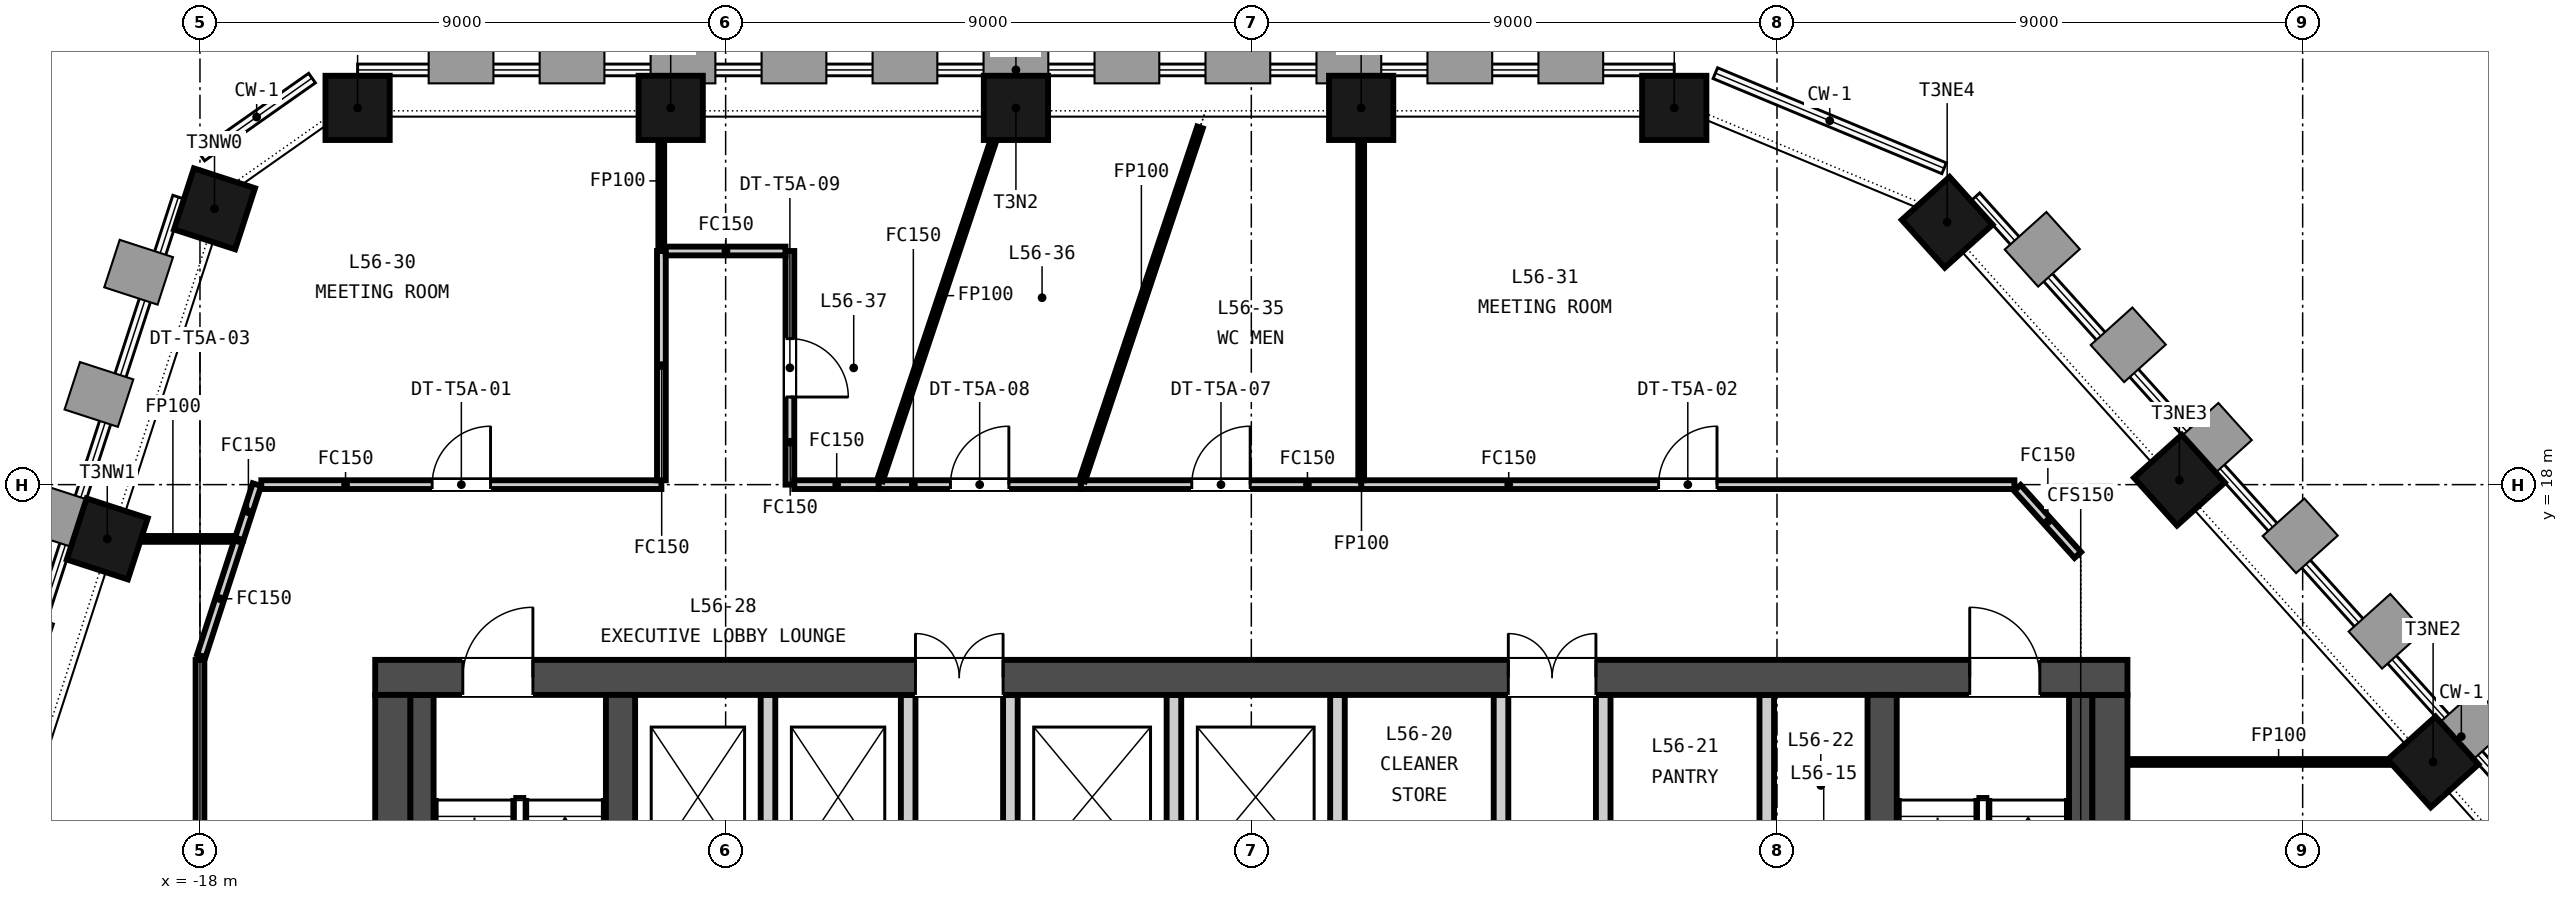
"""IFC4 building model, lengths in metres.
Left out: names, types, materials, properties, quantities, classifications, styles, units other than length and angle.
Written with IfcOpenShell. Run it as: python <this file> out.ifc"""

import sys

from ifc_helpers import new_model, si_unit, direction, frame, frame_2d, origin, origin_2d, place, context, subcontext, project, spatial, rectangle, extrude, element, fill, save


model = new_model("IFC4")
c1 = context("Model", 3, precision=1e-05, world=origin(), true_north=direction((0.0, 1.0)))
c2 = subcontext(c1, "Body", "Model", "MODEL_VIEW")
j1 = project(units=[si_unit("LENGTHUNIT", "METRE"), si_unit("PLANEANGLEUNIT", "RADIAN")], contexts=[c1])
p1 = place(None, origin())
s1 = spatial("IfcSite", under=j1, at=p1, CompositionType="ELEMENT")
p2 = place(p1, origin())
s2 = spatial("IfcBuilding", under=s1, at=p2, CompositionType="ELEMENT")
p3 = place(p2, frame((0.0, 0.0, 223.6)))
s3 = spatial("IfcBuildingStorey", under=s2, at=p3, CompositionType="ELEMENT", Elevation=223.6)
p4 = place(p3, frame((-15.0, 14.7, -0.15), z_axis=(0.0, 0.0, 1.0), x_axis=(1.0, 0.0, 0.0)))
e1 = element("IfcWall", 1, at=p4, inside=s3, PredefinedType="SOLIDWALL", context=c2, shape_type="SweptSolid", body=[
    extrude(rectangle(XDim=30.0, YDim=0.6, at=frame_2d((15.0, 0.0))), origin(), (0.0, 0.0, 1.0), 3.65),
])
p5 = place(p4, frame((9.25, 0.0, 0.15)))
e2 = element("IfcOpeningElement", 2, at=p5, cuts=e1, PredefinedType="OPENING", context=c2, shape_type="SweptSolid", body=[
    extrude(rectangle(XDim=1.5, YDim=2.1, at=frame_2d((0.75, 1.05))), frame((0.0, 0.31, 0.0), z_axis=(0.0, -1.0, 0.0), x_axis=(1.0, 0.0, 0.0)), (0.0, 0.0, 1.0), 0.62),
])
p6 = place(p4, frame((19.4, 0.0, 0.15)))
e3 = element("IfcOpeningElement", 3, at=p6, cuts=e1, PredefinedType="OPENING", context=c2, shape_type="SweptSolid", body=[
    extrude(rectangle(XDim=1.5, YDim=2.1, at=frame_2d((0.75, 1.05))), frame((0.0, 0.31, 0.0), z_axis=(0.0, -1.0, 0.0), x_axis=(1.0, 0.0, 0.0)), (0.0, 0.0, 1.0), 0.62),
])
p7 = place(p4, frame((1.5, 0.0, 0.15)))
e4 = element("IfcOpeningElement", 4, at=p7, cuts=e1, PredefinedType="OPENING", context=c2, shape_type="SweptSolid", body=[
    extrude(rectangle(XDim=1.2, YDim=2.1, at=frame_2d((0.6, 1.05))), frame((0.0, 0.31, 0.0), z_axis=(0.0, -1.0, 0.0), x_axis=(1.0, 0.0, 0.0)), (0.0, 0.0, 1.0), 0.62),
])
p8 = place(p4, frame((27.3, 0.0, 0.15)))
e5 = element("IfcOpeningElement", 5, at=p8, cuts=e1, PredefinedType="OPENING", context=c2, shape_type="SweptSolid", body=[
    extrude(rectangle(XDim=1.2, YDim=2.1, at=frame_2d((0.6, 1.05))), frame((0.0, 0.31, 0.0), z_axis=(0.0, -1.0, 0.0), x_axis=(1.0, 0.0, 0.0)), (0.0, 0.0, 1.0), 0.62),
])
for number, where, z_axis, x_axis in (
    (6, (-14.7, 0.6, -0.15), (0.0, 0.0, 1.0), (0.0, 1.0, 0.0)),
    (7, (14.7, 0.6, -0.15), (0.0, 0.0, 1.0), (0.0, 1.0, 0.0)),
):
    element("IfcWall", number, at=place(p3, frame(where, z_axis=z_axis, x_axis=x_axis)), inside=s3, PredefinedType="SOLIDWALL", context=c2, shape_type="SweptSolid", body=[
        extrude(rectangle(XDim=13.8, YDim=0.6, at=frame_2d((6.9, 0.0))), origin(), (0.0, 0.0, 1.0), 3.65),
    ])
for number, where, z_axis, x_axis in (
    (8, (-10.8, 0.6, -0.15), (0.0, 0.0, 1.0), (0.0, 1.0, 0.0)),
    (9, (10.8, 0.6, -0.15), (0.0, 0.0, 1.0), (0.0, 1.0, 0.0)),
):
    element("IfcWall", number, at=place(p3, frame(where, z_axis=z_axis, x_axis=x_axis)), inside=s3, PredefinedType="SOLIDWALL", context=c2, shape_type="SweptSolid", body=[
        extrude(rectangle(XDim=13.8, YDim=0.5, at=frame_2d((6.9, 0.0))), origin(), (0.0, 0.0, 1.0), 3.65),
    ])
for number, where, z_axis, x_axis in (
    (10, (7.241, 24.45, -0.15), (0.0, 0.0, 1.0), (-1.0, 0.0, 0.0)),
    (11, (1.881, 24.45, -0.15), (0.0, 0.0, 1.0), (-1.0, 0.0, 0.0)),
    (12, (-4.03, 24.45, -0.15), (0.0, 0.0, 1.0), (-1.0, 0.0, 0.0)),
    (13, (-9.941, 24.45, -0.15), (0.0, 0.0, 1.0), (-1.0, 0.0, 0.0)),
    (14, (-15.301, 24.45, -0.15), (0.0, 0.0, 1.0), (-1.0, 0.0, 0.0)),
    (15, (-17.751, 22.722, -0.15), (0.0, 0.0, 1.0), (-0.309, -0.951, 0.0)),
    (16, (-19.587, 17.071, -0.15), (0.0, 0.0, 1.0), (-0.309, -0.951, 0.0)),
    (17, (20.233, 13.252, -0.15), (0.0, 0.0, 1.0), (-0.669, 0.743, 0.0)),
    (18, (15.89, 18.076, -0.15), (0.0, 0.0, 1.0), (-0.669, 0.743, 0.0)),
    (19, (11.914, 22.492, -0.15), (0.0, 0.0, 1.0), (-0.669, 0.743, 0.0)),
):
    element("IfcColumn", number, at=place(p3, frame(where, z_axis=z_axis, x_axis=x_axis)), inside=s3, PredefinedType="COLUMN", context=c2, shape_type="SweptSolid", body=[
        extrude(rectangle(XDim=1.1, YDim=1.1, at=origin_2d()), origin(), (0.0, 0.0, 1.0), 3.65),
    ])
for number, where, z_axis, x_axis in (
    (20, (-8.275, 11.3, 0.0), (0.0, 0.0, 1.0), (0.0, 1.0, 0.0)),
    (21, (-5.875, 11.3, 0.0), (0.0, 0.0, 1.0), (0.0, 1.0, 0.0)),
    (22, (-4.125, 11.3, 0.0), (0.0, 0.0, 1.0), (0.0, 1.0, 0.0)),
    (23, (-1.325, 11.3, 0.0), (0.0, 0.0, 1.0), (0.0, 1.0, 0.0)),
    (24, (1.475, 11.3, 0.0), (0.0, 0.0, 1.0), (0.0, 1.0, 0.0)),
    (25, (4.275, 11.3, 0.0), (0.0, 0.0, 1.0), (0.0, 1.0, 0.0)),
    (26, (6.025, 11.3, 0.0), (0.0, 0.0, 1.0), (0.0, 1.0, 0.0)),
    (27, (8.825, 11.3, 0.0), (0.0, 0.0, 1.0), (0.0, 1.0, 0.0)),
):
    element("IfcWall", number, at=place(p3, frame(where, z_axis=z_axis, x_axis=x_axis)), inside=s3, PredefinedType="PARTITIONING", context=c2, shape_type="SweptSolid", body=[
        extrude(rectangle(XDim=3.1, YDim=0.25, at=frame_2d((1.55, 0.0))), origin(), (0.0, 0.0, 1.0), 3.5),
    ])
for number, where, z_axis, x_axis in (
    (28, (-14.2, 0.6, 0.0), (0.0, 0.0, 1.0), (0.0, 1.0, 0.0)),
    (29, (14.2, 0.6, 0.0), (0.0, 0.0, 1.0), (0.0, 1.0, 0.0)),
):
    element("IfcWall", number, at=place(p3, frame(where, z_axis=z_axis, x_axis=x_axis)), inside=s3, PredefinedType="SOLIDWALL", context=c2, shape_type="SweptSolid", body=[
        extrude(rectangle(XDim=13.8, YDim=0.4, at=frame_2d((6.9, 0.0))), origin(), (0.0, 0.0, 1.0), 3.5),
    ])
p9 = place(p3, frame((-7.9, 22.0, 0.0), z_axis=(0.0, 0.0, 1.0), x_axis=(0.0, -1.0, 0.0)))
e30 = element("IfcWall", 30, at=p9, inside=s3, PredefinedType="PARTITIONING", context=c2, shape_type="SweptSolid", body=[
    extrude(rectangle(XDim=4.0, YDim=0.15, at=frame_2d((2.0, 0.0))), origin(), (0.0, 0.0, 1.0), 2.75),
])
p10 = place(p9, frame((1.5, 0.0, 0.0)))
e31 = element("IfcOpeningElement", 31, at=p10, cuts=e30, PredefinedType="OPENING", context=c2, shape_type="SweptSolid", body=[
    extrude(rectangle(XDim=1.0, YDim=2.1, at=frame_2d((0.5, 1.05))), frame((0.0, 0.085, 0.0), z_axis=(0.0, -1.0, 0.0), x_axis=(1.0, 0.0, 0.0)), (0.0, 0.0, 1.0), 0.17),
])
p11 = place(p3, frame((-17.327, 17.071, 0.0), z_axis=(0.0, 0.0, 1.0), x_axis=(0.309170843074, 0.951006514064, 0.0)))
e32 = element("IfcWall", 32, at=p11, inside=s3, PredefinedType="PARTITIONING", context=c2, shape_type="SweptSolid", body=[
    extrude(rectangle(XDim=0.977, YDim=0.15, at=frame_2d((0.488, 0.0))), origin(), (0.0, 0.0, 1.0), 2.75),
])
p12 = place(p3, frame((-16.95, 18.0, 0.0), z_axis=(0.0, 0.0, 1.0), x_axis=(1.0, 0.0, 0.0)))
e33 = element("IfcWall", 33, at=p12, inside=s3, PredefinedType="PARTITIONING", context=c2, shape_type="SweptSolid", body=[
    extrude(rectangle(XDim=6.85, YDim=0.15, at=frame_2d((3.425, 0.0))), origin(), (0.0, 0.0, 1.0), 2.75),
])
p13 = place(p12, frame((2.925, 0.0, 0.0)))
e34 = element("IfcOpeningElement", 34, at=p13, cuts=e33, PredefinedType="OPENING", context=c2, shape_type="SweptSolid", body=[
    extrude(rectangle(XDim=1.0, YDim=2.1, at=frame_2d((0.5, 1.05))), frame((0.0, 0.085, 0.0), z_axis=(0.0, -1.0, 0.0), x_axis=(1.0, 0.0, 0.0)), (0.0, 0.0, 1.0), 0.17),
])
p14 = place(p3, frame((-10.1, 18.075, 0.0), z_axis=(0.0, 0.0, 1.0), x_axis=(0.0, 1.0, 0.0)))
e35 = element("IfcWall", 35, at=p14, inside=s3, PredefinedType="PARTITIONING", context=c2, shape_type="SweptSolid", body=[
    extrude(rectangle(XDim=3.925, YDim=0.15, at=frame_2d((1.962, 0.0))), origin(), (0.0, 0.0, 1.0), 2.75),
])
p15 = place(p3, frame((-19.535, 17.071, 0.0), z_axis=(0.0, 0.0, 1.0), x_axis=(1.0, 0.0, 0.0)))
e36 = element("IfcWall", 36, at=p15, inside=s3, PredefinedType="PARTITIONING", context=c2, shape_type="SweptSolid", body=[
    extrude(rectangle(XDim=2.133, YDim=0.1, at=frame_2d((1.066, 0.0))), origin(), (0.0, 0.0, 1.0), 2.75),
])
p16 = place(p3, frame((-10.102, 22.0, 0.0), z_axis=(0.0, 0.0, 1.0), x_axis=(0.0, 1.0, 0.0)))
e37 = element("IfcWall", 37, at=p16, inside=s3, PredefinedType="PARTITIONING", context=c2, shape_type="SweptSolid", body=[
    extrude(rectangle(XDim=2.4, YDim=0.1, at=frame_2d((1.2, 0.0))), origin(), (0.0, 0.0, 1.0), 2.75),
])
p17 = place(p3, frame((1.881, 18.0, 0.0), z_axis=(0.0, 0.0, 1.0), x_axis=(1.0, 0.0, 0.0)))
e38 = element("IfcWall", 38, at=p17, inside=s3, PredefinedType="PARTITIONING", context=c2, shape_type="SweptSolid", body=[
    extrude(rectangle(XDim=11.184, YDim=0.15, at=frame_2d((5.592, 0.0))), origin(), (0.0, 0.0, 1.0), 2.75),
])
p18 = place(p17, frame((5.092, 0.0, 0.0)))
e39 = element("IfcOpeningElement", 39, at=p18, cuts=e38, PredefinedType="OPENING", context=c2, shape_type="SweptSolid", body=[
    extrude(rectangle(XDim=1.0, YDim=2.1, at=frame_2d((0.5, 1.05))), frame((0.0, 0.085, 0.0), z_axis=(0.0, -1.0, 0.0), x_axis=(1.0, 0.0, 0.0)), (0.0, 0.0, 1.0), 0.17),
])
p19 = place(p3, frame((13.115, 17.944, 0.0), z_axis=(0.0, 0.0, 1.0), x_axis=(0.669270047653, -0.74301924828, 0.0)))
e40 = element("IfcWall", 40, at=p19, inside=s3, PredefinedType="PARTITIONING", context=c2, shape_type="SweptSolid", body=[
    extrude(rectangle(XDim=1.546, YDim=0.15, at=frame_2d((0.773, 0.0))), origin(), (0.0, 0.0, 1.0), 2.75),
])
p20 = place(p3, frame((15.0, 13.252, 0.0), z_axis=(0.0, 0.0, 1.0), x_axis=(1.0, 0.0, 0.0)))
e41 = element("IfcWall", 41, at=p20, inside=s3, PredefinedType="PARTITIONING", context=c2, shape_type="SweptSolid", body=[
    extrude(rectangle(XDim=5.166, YDim=0.1, at=frame_2d((2.583, 0.0))), origin(), (0.0, 0.0, 1.0), 2.75),
])
p21 = place(p3, frame((-18.0, 4.723, 0.0), z_axis=(0.0, 0.0, 1.0), x_axis=(0.0, 1.0, 0.0)))
e42 = element("IfcWall", 42, at=p21, inside=s3, PredefinedType="PARTITIONING", context=c2, shape_type="SweptSolid", body=[
    extrude(rectangle(XDim=10.275, YDim=0.15, at=frame_2d((5.138, 0.0))), origin(), (0.0, 0.0, 1.0), 2.75),
])
p22 = place(p21, frame((4.637, 0.0, 0.0)))
e43 = element("IfcOpeningElement", 43, at=p22, cuts=e42, PredefinedType="OPENING", context=c2, shape_type="SweptSolid", body=[
    extrude(rectangle(XDim=1.0, YDim=2.1, at=frame_2d((0.5, 1.05))), frame((0.0, 0.085, 0.0), z_axis=(0.0, -1.0, 0.0), x_axis=(1.0, 0.0, 0.0)), (0.0, 0.0, 1.0), 0.17),
])
p23 = place(p3, frame((-17.977, 15.069, 0.0), z_axis=(0.0, 0.0, 1.0), x_axis=(0.308838863498, 0.951114376084, 0.0)))
e44 = element("IfcWall", 44, at=p23, inside=s3, PredefinedType="PARTITIONING", context=c2, shape_type="SweptSolid", body=[
    extrude(rectangle(XDim=2.054, YDim=0.15, at=frame_2d((1.027, 0.0))), origin(), (0.0, 0.0, 1.0), 2.75),
])
p24 = place(p3, frame((-2.92, 18.0, 0.0), z_axis=(0.0, 0.0, 1.0), x_axis=(1.0, 0.0, 0.0)))
e45 = element("IfcWall", 45, at=p24, inside=s3, PredefinedType="PARTITIONING", context=c2, shape_type="SweptSolid", body=[
    extrude(rectangle(XDim=4.801, YDim=0.15, at=frame_2d((2.4, 0.0))), origin(), (0.0, 0.0, 1.0), 2.75),
])
p25 = place(p24, frame((1.9, 0.0, 0.0)))
e46 = element("IfcOpeningElement", 46, at=p25, cuts=e45, PredefinedType="OPENING", context=c2, shape_type="SweptSolid", body=[
    extrude(rectangle(XDim=1.0, YDim=2.1, at=frame_2d((0.5, 1.05))), frame((0.0, 0.085, 0.0), z_axis=(0.0, -1.0, 0.0), x_axis=(1.0, 0.0, 0.0)), (0.0, 0.0, 1.0), 0.17),
])
p26 = place(p3, frame((1.881, 18.075, 0.0), z_axis=(0.0, 0.0, 1.0), x_axis=(0.0, 1.0, 0.0)))
e47 = element("IfcWall", 47, at=p26, inside=s3, PredefinedType="PARTITIONING", context=c2, shape_type="SweptSolid", body=[
    extrude(rectangle(XDim=6.325, YDim=0.1, at=frame_2d((3.163, 0.0))), origin(), (0.0, 0.0, 1.0), 2.75),
])
p27 = place(p3, frame((-6.382, 18.0, 0.0), z_axis=(0.0, 0.0, 1.0), x_axis=(1.0, 0.0, 0.0)))
e48 = element("IfcWall", 48, at=p27, inside=s3, PredefinedType="PARTITIONING", context=c2, shape_type="SweptSolid", body=[
    extrude(rectangle(XDim=3.462, YDim=0.15, at=frame_2d((1.731, 0.0))), origin(), (0.0, 0.0, 1.0), 2.75),
])
p28 = place(p27, frame((1.231, 0.0, 0.0)))
e49 = element("IfcOpeningElement", 49, at=p28, cuts=e48, PredefinedType="OPENING", context=c2, shape_type="SweptSolid", body=[
    extrude(rectangle(XDim=1.0, YDim=2.1, at=frame_2d((0.5, 1.05))), frame((0.0, 0.085, 0.0), z_axis=(0.0, -1.0, 0.0), x_axis=(1.0, 0.0, 0.0)), (0.0, 0.0, 1.0), 0.17),
])
p29 = place(p3, frame((-2.896, 18.071, 0.0), z_axis=(0.0, 0.0, 1.0), x_axis=(0.316721942661, 0.948518429466, 0.0)))
e50 = element("IfcWall", 50, at=p29, inside=s3, PredefinedType="PARTITIONING", context=c2, shape_type="SweptSolid", body=[
    extrude(rectangle(XDim=6.373, YDim=0.1, at=frame_2d((3.186, 0.0))), origin(), (0.0, 0.0, 1.0), 2.75),
])
p30 = place(p3, frame((-10.025, 22.0, 0.0), z_axis=(0.0, 0.0, 1.0), x_axis=(1.0, 0.0, 0.0)))
e51 = element("IfcWall", 51, at=p30, inside=s3, PredefinedType="PARTITIONING", context=c2, shape_type="SweptSolid", body=[
    extrude(rectangle(XDim=2.05, YDim=0.15, at=frame_2d((1.025, 0.0))), origin(), (0.0, 0.0, 1.0), 2.75),
])
p31 = place(p3, frame((-7.825, 18.0, 0.0), z_axis=(0.0, 0.0, 1.0), x_axis=(1.0, 0.0, 0.0)))
e52 = element("IfcWall", 52, at=p31, inside=s3, PredefinedType="PARTITIONING", context=c2, shape_type="SweptSolid", body=[
    extrude(rectangle(XDim=1.443, YDim=0.15, at=frame_2d((0.721, 0.0))), origin(), (0.0, 0.0, 1.0), 2.75),
])
p32 = place(p3, frame((-6.358, 18.071, 0.0), z_axis=(0.0, 0.0, 1.0), x_axis=(0.316688766046, 0.9485295069, 0.0)))
e53 = element("IfcWall", 53, at=p32, inside=s3, PredefinedType="PARTITIONING", context=c2, shape_type="SweptSolid", body=[
    extrude(rectangle(XDim=6.672, YDim=0.1, at=frame_2d((3.336, 0.0))), origin(), (0.0, 0.0, 1.0), 2.75),
])
p33 = place(p5, origin())
e54 = element("IfcDoor", 54, at=p33, inside=s3, OperationType="DOUBLE_DOOR_SINGLE_SWING", PredefinedType="DOOR", context=c2, shape_type="SweptSolid", body=[
    extrude(rectangle(XDim=1.5, YDim=2.1, at=frame_2d((0.75, 1.05))), frame((0.0, 0.025, 0.0), z_axis=(0.0, -1.0, 0.0), x_axis=(1.0, 0.0, 0.0)), (0.0, 0.0, 1.0), 0.05),
])
fill(e2, e54)
p34 = place(p6, origin())
e55 = element("IfcDoor", 55, at=p34, inside=s3, OperationType="DOUBLE_DOOR_SINGLE_SWING", PredefinedType="DOOR", context=c2, shape_type="SweptSolid", body=[
    extrude(rectangle(XDim=1.5, YDim=2.1, at=frame_2d((0.75, 1.05))), frame((0.0, 0.025, 0.0), z_axis=(0.0, -1.0, 0.0), x_axis=(1.0, 0.0, 0.0)), (0.0, 0.0, 1.0), 0.05),
])
fill(e3, e55)
p35 = place(p7, origin())
e56 = element("IfcDoor", 56, at=p35, inside=s3, OperationType="SINGLE_SWING_RIGHT", PredefinedType="DOOR", context=c2, shape_type="SweptSolid", body=[
    extrude(rectangle(XDim=1.2, YDim=2.1, at=frame_2d((0.6, 1.05))), frame((0.0, 0.025, 0.0), z_axis=(0.0, -1.0, 0.0), x_axis=(1.0, 0.0, 0.0)), (0.0, 0.0, 1.0), 0.05),
])
fill(e4, e56)
p36 = place(p8, origin())
e57 = element("IfcDoor", 57, at=p36, inside=s3, OperationType="SINGLE_SWING_LEFT", PredefinedType="DOOR", context=c2, shape_type="SweptSolid", body=[
    extrude(rectangle(XDim=1.2, YDim=2.1, at=frame_2d((0.6, 1.05))), frame((0.0, 0.025, 0.0), z_axis=(0.0, -1.0, 0.0), x_axis=(1.0, 0.0, 0.0)), (0.0, 0.0, 1.0), 0.05),
])
fill(e5, e57)
p37 = place(p13, origin())
e58 = element("IfcDoor", 58, at=p37, inside=s3, OperationType="SINGLE_SWING_RIGHT", PredefinedType="DOOR", context=c2, shape_type="SweptSolid", body=[
    extrude(rectangle(XDim=1.0, YDim=2.1, at=frame_2d((0.5, 1.05))), frame((0.0, 0.025, 0.0), z_axis=(0.0, -1.0, 0.0), x_axis=(1.0, 0.0, 0.0)), (0.0, 0.0, 1.0), 0.05),
])
fill(e34, e58)
p38 = place(p18, origin())
e59 = element("IfcDoor", 59, at=p38, inside=s3, OperationType="SINGLE_SWING_RIGHT", PredefinedType="DOOR", context=c2, shape_type="SweptSolid", body=[
    extrude(rectangle(XDim=1.0, YDim=2.1, at=frame_2d((0.5, 1.05))), frame((0.0, 0.025, 0.0), z_axis=(0.0, -1.0, 0.0), x_axis=(1.0, 0.0, 0.0)), (0.0, 0.0, 1.0), 0.05),
])
fill(e39, e59)
p39 = place(p25, origin())
e60 = element("IfcDoor", 60, at=p39, inside=s3, OperationType="SINGLE_SWING_RIGHT", PredefinedType="DOOR", context=c2, shape_type="SweptSolid", body=[
    extrude(rectangle(XDim=1.0, YDim=2.1, at=frame_2d((0.5, 1.05))), frame((0.0, 0.025, 0.0), z_axis=(0.0, -1.0, 0.0), x_axis=(1.0, 0.0, 0.0)), (0.0, 0.0, 1.0), 0.05),
])
fill(e46, e60)
p40 = place(p28, origin())
e61 = element("IfcDoor", 61, at=p40, inside=s3, OperationType="SINGLE_SWING_RIGHT", PredefinedType="DOOR", context=c2, shape_type="SweptSolid", body=[
    extrude(rectangle(XDim=1.0, YDim=2.1, at=frame_2d((0.5, 1.05))), frame((0.0, 0.025, 0.0), z_axis=(0.0, -1.0, 0.0), x_axis=(1.0, 0.0, 0.0)), (0.0, 0.0, 1.0), 0.05),
])
fill(e49, e61)
p41 = place(p10, origin())
e62 = element("IfcDoor", 62, at=p41, inside=s3, OperationType="SINGLE_SWING_RIGHT", PredefinedType="DOOR", context=c2, shape_type="SweptSolid", body=[
    extrude(rectangle(XDim=1.0, YDim=2.1, at=frame_2d((0.5, 1.05))), frame((0.0, 0.025, 0.0), z_axis=(0.0, -1.0, 0.0), x_axis=(1.0, 0.0, 0.0)), (0.0, 0.0, 1.0), 0.05),
])
fill(e31, e62)
save(model, sys.argv[1])
